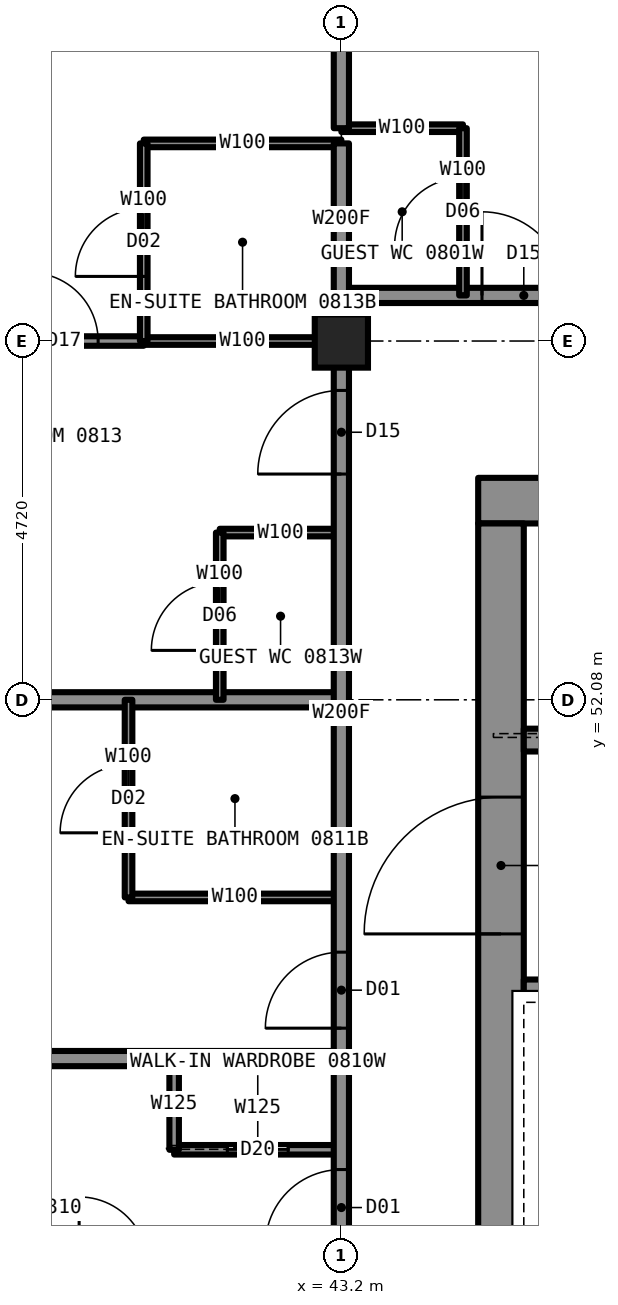
"""IFC4 building model, lengths in metres.
Left out: names, types, materials, properties, quantities, classifications, styles, units other than length and angle.
Written with IfcOpenShell. Run it as: python <this file> out.ifc"""

import sys

from ifc_helpers import new_model, si_unit, direction, frame, frame_2d, origin, origin_2d, place, context, subcontext, project, spatial, rectangle, hollow_rectangle, extrude, element, fill, save


model = new_model("IFC4")
c1 = context("Model", 3, precision=1e-05, world=origin(), true_north=direction((0.0, 1.0)))
c2 = subcontext(c1, "Body", "Model", "MODEL_VIEW")
j1 = project(units=[si_unit("LENGTHUNIT", "METRE"), si_unit("PLANEANGLEUNIT", "RADIAN")], contexts=[c1])
p1 = place(None, origin())
s1 = spatial("IfcSite", under=j1, at=p1, CompositionType="ELEMENT")
p2 = place(p1, origin())
s2 = spatial("IfcBuilding", under=s1, at=p2, CompositionType="ELEMENT")
p3 = place(p2, frame((0.0, 0.0, 28.5)))
s3 = spatial("IfcBuildingStorey", under=s2, at=p3, CompositionType="ELEMENT", Elevation=28.5)
p4 = place(p3, frame((43.2, 56.8, 0.0), z_axis=(0.0, 0.0, 1.0), x_axis=(1.0, 0.0, 0.0)))
e1 = element("IfcColumn", 1, at=p4, inside=s3, PredefinedType="COLUMN", context=c2, shape_type="SweptSolid", body=[
    extrude(hollow_rectangle(XDim=0.7, YDim=0.7, WallThickness=0.06, at=origin_2d()), origin(), (0.0, 0.0, 1.0), 3.5),
])
p5 = place(p3, frame((45.0, 54.7, 0.0), z_axis=(0.0, 0.0, 1.0), x_axis=(1.0, 0.0, 0.0)))
e2 = element("IfcWall", 2, at=p5, inside=s3, PredefinedType="SHEAR", context=c2, shape_type="SweptSolid", body=[
    extrude(rectangle(XDim=20.0, YDim=0.6, at=frame_2d((10.0, 0.0))), origin(), (0.0, 0.0, 1.0), 3.5),
])
p6 = place(p3, frame((45.3, 35.6, 0.0), z_axis=(0.0, 0.0, 1.0), x_axis=(0.0, 1.0, 0.0)))
e3 = element("IfcWall", 3, at=p6, inside=s3, PredefinedType="SHEAR", context=c2, shape_type="SweptSolid", body=[
    extrude(rectangle(XDim=18.8, YDim=0.6, at=frame_2d((9.4, 0.0))), origin(), (0.0, 0.0, 1.0), 3.5),
])
p7 = place(p6, frame((13.4, 0.0, 0.0)))
e4 = element("IfcOpeningElement", 4, at=p7, cuts=e3, PredefinedType="OPENING", context=c2, shape_type="SweptSolid", body=[
    extrude(rectangle(XDim=1.8, YDim=2.2, at=frame_2d((0.9, 1.1))), frame((0.0, 0.31, 0.0), z_axis=(0.0, -1.0, 0.0), x_axis=(1.0, 0.0, 0.0)), (0.0, 0.0, 1.0), 0.62),
])
p8 = place(p6, frame((3.6, 0.0, 0.0)))
e5 = element("IfcOpeningElement", 5, at=p8, cuts=e3, PredefinedType="OPENING", context=c2, shape_type="SweptSolid", body=[
    extrude(rectangle(XDim=1.8, YDim=2.2, at=frame_2d((0.9, 1.1))), frame((0.0, 0.31, 0.0), z_axis=(0.0, -1.0, 0.0), x_axis=(1.0, 0.0, 0.0)), (0.0, 0.0, 1.0), 0.62),
])
p9 = place(p6, frame((6.4, 0.0, 0.0)))
e6 = element("IfcOpeningElement", 6, at=p9, cuts=e3, PredefinedType="OPENING", context=c2, shape_type="SweptSolid", body=[
    extrude(rectangle(XDim=1.2, YDim=2.2, at=frame_2d((0.6, 1.1))), frame((0.0, 0.31, 0.0), z_axis=(0.0, -1.0, 0.0), x_axis=(1.0, 0.0, 0.0)), (0.0, 0.0, 1.0), 0.62),
])
p10 = place(p3, frame((45.6, 51.55, 0.0), z_axis=(0.0, 0.0, 1.0), x_axis=(1.0, 0.0, 0.0)))
e7 = element("IfcWall", 7, at=p10, inside=s3, PredefinedType="SHEAR", context=c2, shape_type="SweptSolid", body=[
    extrude(rectangle(XDim=18.8, YDim=0.3, at=frame_2d((9.4, 0.0))), origin(), (0.0, 0.0, 1.0), 3.5),
])
p11 = place(p10, frame((0.7, 0.0, 0.0)))
e8 = element("IfcOpeningElement", 8, at=p11, cuts=e7, PredefinedType="OPENING", context=c2, shape_type="SweptSolid", body=[
    extrude(rectangle(XDim=1.1, YDim=2.2, at=frame_2d((0.55, 1.1))), frame((0.0, 0.16, 0.0), z_axis=(0.0, -1.0, 0.0), x_axis=(1.0, 0.0, 0.0)), (0.0, 0.0, 1.0), 0.32),
])
p12 = place(p10, frame((3.4, 0.0, 0.0)))
e9 = element("IfcOpeningElement", 9, at=p12, cuts=e7, PredefinedType="OPENING", context=c2, shape_type="SweptSolid", body=[
    extrude(rectangle(XDim=1.1, YDim=2.2, at=frame_2d((0.55, 1.1))), frame((0.0, 0.16, 0.0), z_axis=(0.0, -1.0, 0.0), x_axis=(1.0, 0.0, 0.0)), (0.0, 0.0, 1.0), 0.32),
])
p13 = place(p10, frame((6.1, 0.0, 0.0)))
e10 = element("IfcOpeningElement", 10, at=p13, cuts=e7, PredefinedType="OPENING", context=c2, shape_type="SweptSolid", body=[
    extrude(rectangle(XDim=1.1, YDim=2.2, at=frame_2d((0.55, 1.1))), frame((0.0, 0.16, 0.0), z_axis=(0.0, -1.0, 0.0), x_axis=(1.0, 0.0, 0.0)), (0.0, 0.0, 1.0), 0.32),
])
p14 = place(p10, frame((8.8, 0.0, 0.0)))
e11 = element("IfcOpeningElement", 11, at=p14, cuts=e7, PredefinedType="OPENING", context=c2, shape_type="SweptSolid", body=[
    extrude(rectangle(XDim=1.1, YDim=2.2, at=frame_2d((0.55, 1.1))), frame((0.0, 0.16, 0.0), z_axis=(0.0, -1.0, 0.0), x_axis=(1.0, 0.0, 0.0)), (0.0, 0.0, 1.0), 0.32),
])
p15 = place(p10, frame((11.6, 0.0, 0.0)))
e12 = element("IfcOpeningElement", 12, at=p15, cuts=e7, PredefinedType="OPENING", context=c2, shape_type="SweptSolid", body=[
    extrude(rectangle(XDim=1.1, YDim=2.2, at=frame_2d((0.55, 1.1))), frame((0.0, 0.16, 0.0), z_axis=(0.0, -1.0, 0.0), x_axis=(1.0, 0.0, 0.0)), (0.0, 0.0, 1.0), 0.32),
])
p16 = place(p10, frame((14.3, 0.0, 0.0)))
e13 = element("IfcOpeningElement", 13, at=p16, cuts=e7, PredefinedType="OPENING", context=c2, shape_type="SweptSolid", body=[
    extrude(rectangle(XDim=1.1, YDim=2.2, at=frame_2d((0.55, 1.1))), frame((0.0, 0.16, 0.0), z_axis=(0.0, -1.0, 0.0), x_axis=(1.0, 0.0, 0.0)), (0.0, 0.0, 1.0), 0.32),
])
p17 = place(p3, frame((45.6, 48.25, 0.0), z_axis=(0.0, 0.0, 1.0), x_axis=(1.0, 0.0, 0.0)))
e14 = element("IfcWall", 14, at=p17, inside=s3, PredefinedType="SHEAR", context=c2, shape_type="SweptSolid", body=[
    extrude(rectangle(XDim=7.1, YDim=0.3, at=frame_2d((3.55, 0.0))), origin(), (0.0, 0.0, 1.0), 3.5),
])
p18 = place(p3, frame((41.0, 46.16, 0.0), z_axis=(0.0, 0.0, 1.0), x_axis=(1.0, 0.0, 0.0)))
e15 = element("IfcWall", 15, at=p18, inside=s3, PredefinedType="PARTITIONING", context=c2, shape_type="SweptSolid", body=[
    extrude(rectangle(XDim=2.2, YDim=0.125, at=frame_2d((1.1, 0.0))), origin(), (0.0, 0.0, 1.0), 3.33),
])
p19 = place(p18, frame((0.7, 0.0, 0.0)))
e16 = element("IfcOpeningElement", 16, at=p19, cuts=e15, PredefinedType="OPENING", context=c2, shape_type="SweptSolid", body=[
    extrude(rectangle(XDim=0.8, YDim=2.1, at=frame_2d((0.4, 1.05))), frame((0.0, 0.073, 0.0), z_axis=(0.0, -1.0, 0.0), x_axis=(1.0, 0.0, 0.0)), (0.0, 0.0, 1.0), 0.145),
])
p20 = place(p3, frame((40.6, 56.8, 0.0), z_axis=(0.0, 0.0, 1.0), x_axis=(1.0, 0.0, 0.0)))
e17 = element("IfcWall", 17, at=p20, inside=s3, PredefinedType="PARTITIONING", context=c2, shape_type="SweptSolid", body=[
    extrude(rectangle(XDim=2.6, YDim=0.1, at=frame_2d((1.3, 0.0))), origin(), (0.0, 0.0, 1.0), 2.573),
])
p21 = place(p3, frame((33.3, 56.8, 0.0), z_axis=(0.0, 0.0, 1.0), x_axis=(1.0, 0.0, 0.0)))
e18 = element("IfcWall", 18, at=p21, inside=s3, PredefinedType="PARTITIONING", context=c2, shape_type="SweptSolid", body=[
    extrude(rectangle(XDim=7.3, YDim=0.125, at=frame_2d((3.65, 0.0))), origin(), (0.0, 0.0, 1.0), 2.573),
])
p22 = place(p21, frame((5.8, 0.0, 0.0)))
e19 = element("IfcOpeningElement", 19, at=p22, cuts=e18, PredefinedType="OPENING", context=c2, shape_type="SweptSolid", body=[
    extrude(rectangle(XDim=0.9, YDim=2.2, at=frame_2d((0.45, 1.1))), frame((0.0, 0.073, 0.0), z_axis=(0.0, -1.0, 0.0), x_axis=(1.0, 0.0, 0.0)), (0.0, 0.0, 1.0), 0.145),
])
p23 = place(p21, frame((2.0, 0.0, 0.0)))
e20 = element("IfcOpeningElement", 20, at=p23, cuts=e18, PredefinedType="OPENING", context=c2, shape_type="SweptSolid", body=[
    extrude(rectangle(XDim=0.9, YDim=2.2, at=frame_2d((0.45, 1.1))), frame((0.0, 0.073, 0.0), z_axis=(0.0, -1.0, 0.0), x_axis=(1.0, 0.0, 0.0)), (0.0, 0.0, 1.0), 0.145),
])
p24 = place(p3, frame((43.2, 57.4, 0.0), z_axis=(0.0, 0.0, 1.0), x_axis=(1.0, 0.0, 0.0)))
e21 = element("IfcWall", 21, at=p24, inside=s3, PredefinedType="PARTITIONING", context=c2, shape_type="SweptSolid", body=[
    extrude(rectangle(XDim=23.6, YDim=0.2, at=frame_2d((11.8, 0.0))), origin(), (0.0, 0.0, 1.0), 3.33),
])
p25 = place(p24, frame((1.85, 0.0, 0.0)))
e22 = element("IfcOpeningElement", 22, at=p25, cuts=e21, PredefinedType="OPENING", context=c2, shape_type="SweptSolid", body=[
    extrude(rectangle(XDim=1.1, YDim=2.2, at=frame_2d((0.55, 1.1))), frame((0.0, 0.11, 0.0), z_axis=(0.0, -1.0, 0.0), x_axis=(1.0, 0.0, 0.0)), (0.0, 0.0, 1.0), 0.22),
])
p26 = place(p24, frame((15.62, 0.0, 0.0)))
e23 = element("IfcOpeningElement", 23, at=p26, cuts=e21, PredefinedType="OPENING", context=c2, shape_type="SweptSolid", body=[
    extrude(rectangle(XDim=1.0, YDim=2.2, at=frame_2d((0.5, 1.1))), frame((0.0, 0.11, 0.0), z_axis=(0.0, -1.0, 0.0), x_axis=(1.0, 0.0, 0.0)), (0.0, 0.0, 1.0), 0.22),
])
p27 = place(p24, frame((20.34, 0.0, 0.0)))
e24 = element("IfcOpeningElement", 24, at=p27, cuts=e21, PredefinedType="OPENING", context=c2, shape_type="SweptSolid", body=[
    extrude(rectangle(XDim=1.0, YDim=2.2, at=frame_2d((0.5, 1.1))), frame((0.0, 0.11, 0.0), z_axis=(0.0, -1.0, 0.0), x_axis=(1.0, 0.0, 0.0)), (0.0, 0.0, 1.0), 0.22),
])
p28 = place(p3, frame((40.6, 59.4, 0.0), z_axis=(0.0, 0.0, 1.0), x_axis=(1.0, 0.0, 0.0)))
e25 = element("IfcWall", 25, at=p28, inside=s3, PredefinedType="PARTITIONING", context=c2, shape_type="SweptSolid", body=[
    extrude(rectangle(XDim=2.6, YDim=0.1, at=frame_2d((1.3, 0.0))), origin(), (0.0, 0.0, 1.0), 3.33),
])
p29 = place(p3, frame((43.2, 59.6, 0.0), z_axis=(0.0, 0.0, 1.0), x_axis=(1.0, 0.0, 0.0)))
e26 = element("IfcWall", 26, at=p29, inside=s3, PredefinedType="PARTITIONING", context=c2, shape_type="SweptSolid", body=[
    extrude(rectangle(XDim=1.6, YDim=0.1, at=frame_2d((0.8, 0.0))), origin(), (0.0, 0.0, 1.0), 3.33),
])
p30 = place(p3, frame((33.3, 47.36, 0.0), z_axis=(0.0, 0.0, 1.0), x_axis=(1.0, 0.0, 0.0)))
e27 = element("IfcWall", 27, at=p30, inside=s3, PredefinedType="PARTITIONING", context=c2, shape_type="SweptSolid", body=[
    extrude(rectangle(XDim=9.9, YDim=0.2, at=frame_2d((4.95, 0.0))), origin(), (0.0, 0.0, 1.0), 2.723),
])
p31 = place(p3, frame((40.4, 49.48, 0.0), z_axis=(0.0, 0.0, 1.0), x_axis=(1.0, 0.0, 0.0)))
e28 = element("IfcWall", 28, at=p31, inside=s3, PredefinedType="PARTITIONING", context=c2, shape_type="SweptSolid", body=[
    extrude(rectangle(XDim=2.8, YDim=0.1, at=frame_2d((1.4, 0.0))), origin(), (0.0, 0.0, 1.0), 3.33),
])
p32 = place(p3, frame((33.3, 52.08, 0.0), z_axis=(0.0, 0.0, 1.0), x_axis=(1.0, 0.0, 0.0)))
e29 = element("IfcWall", 29, at=p32, inside=s3, PredefinedType="PARTITIONING", context=c2, shape_type="SweptSolid", body=[
    extrude(rectangle(XDim=9.9, YDim=0.2, at=frame_2d((4.95, 0.0))), origin(), (0.0, 0.0, 1.0), 2.573),
])
p33 = place(p3, frame((41.6, 54.28, 0.0), z_axis=(0.0, 0.0, 1.0), x_axis=(1.0, 0.0, 0.0)))
e30 = element("IfcWall", 30, at=p33, inside=s3, PredefinedType="PARTITIONING", context=c2, shape_type="SweptSolid", body=[
    extrude(rectangle(XDim=1.6, YDim=0.1, at=frame_2d((0.8, 0.0))), origin(), (0.0, 0.0, 1.0), 2.723),
])
p34 = place(p3, frame((44.8, 57.4, 0.0), z_axis=(0.0, 0.0, 1.0), x_axis=(0.0, 1.0, 0.0)))
e31 = element("IfcWall", 31, at=p34, inside=s3, PredefinedType="PARTITIONING", context=c2, shape_type="SweptSolid", body=[
    extrude(rectangle(XDim=2.2, YDim=0.1, at=frame_2d((1.1, 0.0))), origin(), (0.0, 0.0, 1.0), 3.33),
])
p35 = place(p34, frame((0.65, 0.0, 0.0)))
e32 = element("IfcOpeningElement", 32, at=p35, cuts=e31, PredefinedType="OPENING", context=c2, shape_type="SweptSolid", body=[
    extrude(rectangle(XDim=0.9, YDim=2.1, at=frame_2d((0.45, 1.05))), frame((0.0, 0.06, 0.0), z_axis=(0.0, -1.0, 0.0), x_axis=(1.0, 0.0, 0.0)), (0.0, 0.0, 1.0), 0.12),
])
p36 = place(p3, frame((43.2, 33.22, 0.0), z_axis=(0.0, 0.0, 1.0), x_axis=(0.0, 1.0, 0.0)))
e33 = element("IfcWall", 33, at=p36, inside=s3, PredefinedType="PARTITIONING", context=c2, shape_type="SweptSolid", body=[
    extrude(rectangle(XDim=23.56, YDim=0.2, at=frame_2d((11.78, 0.0))), origin(), (0.0, 0.0, 1.0), 3.33),
])
p37 = place(p36, frame((6.16, 0.0, 0.0)))
e34 = element("IfcOpeningElement", 34, at=p37, cuts=e33, PredefinedType="OPENING", context=c2, shape_type="SweptSolid", body=[
    extrude(rectangle(XDim=1.0, YDim=2.2, at=frame_2d((0.5, 1.1))), frame((0.0, 0.11, 0.0), z_axis=(0.0, -1.0, 0.0), x_axis=(1.0, 0.0, 0.0)), (0.0, 0.0, 1.0), 0.22),
])
p38 = place(p36, frame((11.68, 0.0, 0.0)))
e35 = element("IfcOpeningElement", 35, at=p38, cuts=e33, PredefinedType="OPENING", context=c2, shape_type="SweptSolid", body=[
    extrude(rectangle(XDim=1.0, YDim=2.2, at=frame_2d((0.5, 1.1))), frame((0.0, 0.11, 0.0), z_axis=(0.0, -1.0, 0.0), x_axis=(1.0, 0.0, 0.0)), (0.0, 0.0, 1.0), 0.22),
])
p39 = place(p36, frame((14.54, 0.0, 0.0)))
e36 = element("IfcOpeningElement", 36, at=p39, cuts=e33, PredefinedType="OPENING", context=c2, shape_type="SweptSolid", body=[
    extrude(rectangle(XDim=1.0, YDim=2.2, at=frame_2d((0.5, 1.1))), frame((0.0, 0.11, 0.0), z_axis=(0.0, -1.0, 0.0), x_axis=(1.0, 0.0, 0.0)), (0.0, 0.0, 1.0), 0.22),
])
p40 = place(p36, frame((21.83, 0.0, 0.0)))
e37 = element("IfcOpeningElement", 37, at=p40, cuts=e33, PredefinedType="OPENING", context=c2, shape_type="SweptSolid", body=[
    extrude(rectangle(XDim=1.1, YDim=2.2, at=frame_2d((0.55, 1.1))), frame((0.0, 0.11, 0.0), z_axis=(0.0, -1.0, 0.0), x_axis=(1.0, 0.0, 0.0)), (0.0, 0.0, 1.0), 0.22),
])
p41 = place(p36, frame((0.63, 0.0, 0.0)))
e38 = element("IfcOpeningElement", 38, at=p41, cuts=e33, PredefinedType="OPENING", context=c2, shape_type="SweptSolid", body=[
    extrude(rectangle(XDim=1.1, YDim=2.2, at=frame_2d((0.55, 1.1))), frame((0.0, 0.11, 0.0), z_axis=(0.0, -1.0, 0.0), x_axis=(1.0, 0.0, 0.0)), (0.0, 0.0, 1.0), 0.22),
])
p42 = place(p3, frame((43.2, 57.4, 0.0), z_axis=(0.0, 0.0, 1.0), x_axis=(0.0, 1.0, 0.0)))
e39 = element("IfcWall", 39, at=p42, inside=s3, PredefinedType="PARTITIONING", context=c2, shape_type="SweptSolid", body=[
    extrude(rectangle(XDim=2.0, YDim=0.2, at=frame_2d((1.0, 0.0))), origin(), (0.0, 0.0, 1.0), 2.573),
])
p43 = place(p3, frame((43.2, 59.6, 0.0), z_axis=(0.0, 0.0, 1.0), x_axis=(0.0, 1.0, 0.0)))
e40 = element("IfcWall", 40, at=p43, inside=s3, PredefinedType="PARTITIONING", context=c2, shape_type="SweptSolid", body=[
    extrude(rectangle(XDim=7.1, YDim=0.2, at=frame_2d((3.55, 0.0))), origin(), (0.0, 0.0, 1.0), 2.573),
])
p44 = place(p3, frame((41.6, 52.08, 0.0), z_axis=(0.0, 0.0, 1.0), x_axis=(0.0, 1.0, 0.0)))
e41 = element("IfcWall", 41, at=p44, inside=s3, PredefinedType="PARTITIONING", context=c2, shape_type="SweptSolid", body=[
    extrude(rectangle(XDim=2.2, YDim=0.1, at=frame_2d((1.1, 0.0))), origin(), (0.0, 0.0, 1.0), 3.33),
])
p45 = place(p44, frame((0.65, 0.0, 0.0)))
e42 = element("IfcOpeningElement", 42, at=p45, cuts=e41, PredefinedType="OPENING", context=c2, shape_type="SweptSolid", body=[
    extrude(rectangle(XDim=0.9, YDim=2.1, at=frame_2d((0.45, 1.05))), frame((0.0, 0.06, 0.0), z_axis=(0.0, -1.0, 0.0), x_axis=(1.0, 0.0, 0.0)), (0.0, 0.0, 1.0), 0.12),
])
p46 = place(p3, frame((41.0, 46.16, 0.0), z_axis=(0.0, 0.0, 1.0), x_axis=(0.0, 1.0, 0.0)))
e43 = element("IfcWall", 43, at=p46, inside=s3, PredefinedType="PARTITIONING", context=c2, shape_type="SweptSolid", body=[
    extrude(rectangle(XDim=1.2, YDim=0.125, at=frame_2d((0.6, 0.0))), origin(), (0.0, 0.0, 1.0), 3.33),
])
p47 = place(p3, frame((40.6, 56.8, 0.0), z_axis=(0.0, 0.0, 1.0), x_axis=(0.0, 1.0, 0.0)))
e44 = element("IfcWall", 44, at=p47, inside=s3, PredefinedType="PARTITIONING", context=c2, shape_type="SweptSolid", body=[
    extrude(rectangle(XDim=2.6, YDim=0.1, at=frame_2d((1.3, 0.0))), origin(), (0.0, 0.0, 1.0), 3.33),
])
p48 = place(p47, frame((0.85, 0.0, 0.0)))
e45 = element("IfcOpeningElement", 45, at=p48, cuts=e44, PredefinedType="OPENING", context=c2, shape_type="SweptSolid", body=[
    extrude(rectangle(XDim=0.9, YDim=2.1, at=frame_2d((0.45, 1.05))), frame((0.0, 0.06, 0.0), z_axis=(0.0, -1.0, 0.0), x_axis=(1.0, 0.0, 0.0)), (0.0, 0.0, 1.0), 0.12),
])
p49 = place(p3, frame((40.4, 49.48, 0.0), z_axis=(0.0, 0.0, 1.0), x_axis=(0.0, 1.0, 0.0)))
e46 = element("IfcWall", 46, at=p49, inside=s3, PredefinedType="PARTITIONING", context=c2, shape_type="SweptSolid", body=[
    extrude(rectangle(XDim=2.6, YDim=0.1, at=frame_2d((1.3, 0.0))), origin(), (0.0, 0.0, 1.0), 3.33),
])
p50 = place(p49, frame((0.85, 0.0, 0.0)))
e47 = element("IfcOpeningElement", 47, at=p50, cuts=e46, PredefinedType="OPENING", context=c2, shape_type="SweptSolid", body=[
    extrude(rectangle(XDim=0.9, YDim=2.1, at=frame_2d((0.45, 1.05))), frame((0.0, 0.06, 0.0), z_axis=(0.0, -1.0, 0.0), x_axis=(1.0, 0.0, 0.0)), (0.0, 0.0, 1.0), 0.12),
])
p51 = place(p3, frame((43.2, 56.78, 0.0), z_axis=(0.0, 0.0, 1.0), x_axis=(0.0, 1.0, 0.0)))
e48 = element("IfcWall", 48, at=p51, inside=s3, PredefinedType="PARTITIONING", context=c2, shape_type="SweptSolid", body=[
    extrude(rectangle(XDim=0.62, YDim=0.2, at=frame_2d((0.31, 0.0))), origin(), (0.0, 0.0, 1.0), 2.573),
])
p52 = place(p25, origin())
e49 = element("IfcDoor", 49, at=p52, inside=s3, OperationType="SINGLE_SWING_LEFT", PredefinedType="DOOR", context=c2, shape_type="SweptSolid", body=[
    extrude(rectangle(XDim=1.1, YDim=2.2, at=frame_2d((0.55, 1.1))), frame((0.0, 0.025, 0.0), z_axis=(0.0, -1.0, 0.0), x_axis=(1.0, 0.0, 0.0)), (0.0, 0.0, 1.0), 0.05),
])
fill(e22, e49)
p53 = place(p35, origin())
e50 = element("IfcDoor", 50, at=p53, inside=s3, OperationType="SINGLE_SWING_LEFT", PredefinedType="DOOR", context=c2, shape_type="SweptSolid", body=[
    extrude(rectangle(XDim=0.9, YDim=2.1, at=frame_2d((0.45, 1.05))), frame((0.0, 0.025, 0.0), z_axis=(0.0, -1.0, 0.0), x_axis=(1.0, 0.0, 0.0)), (0.0, 0.0, 1.0), 0.05),
])
fill(e32, e50)
p54 = place(p38, origin())
e51 = element("IfcDoor", 51, at=p54, inside=s3, OperationType="SINGLE_SWING_LEFT", PredefinedType="DOOR", context=c2, shape_type="SweptSolid", body=[
    extrude(rectangle(XDim=1.0, YDim=2.2, at=frame_2d((0.5, 1.1))), frame((0.0, 0.025, 0.0), z_axis=(0.0, -1.0, 0.0), x_axis=(1.0, 0.0, 0.0)), (0.0, 0.0, 1.0), 0.05),
])
fill(e35, e51)
p55 = place(p19, origin())
e52 = element("IfcDoor", 52, at=p55, inside=s3, OperationType="SLIDING_TO_LEFT", PredefinedType="DOOR", context=c2, shape_type="SweptSolid", body=[
    extrude(rectangle(XDim=0.8, YDim=2.1, at=frame_2d((0.4, 1.05))), frame((0.0, 0.025, 0.0), z_axis=(0.0, -1.0, 0.0), x_axis=(1.0, 0.0, 0.0)), (0.0, 0.0, 1.0), 0.05),
])
fill(e16, e52)
p56 = place(p39, origin())
e53 = element("IfcDoor", 53, at=p56, inside=s3, OperationType="SINGLE_SWING_LEFT", PredefinedType="DOOR", context=c2, shape_type="SweptSolid", body=[
    extrude(rectangle(XDim=1.0, YDim=2.2, at=frame_2d((0.5, 1.1))), frame((0.0, 0.025, 0.0), z_axis=(0.0, -1.0, 0.0), x_axis=(1.0, 0.0, 0.0)), (0.0, 0.0, 1.0), 0.05),
])
fill(e36, e53)
p57 = place(p50, origin())
e54 = element("IfcDoor", 54, at=p57, inside=s3, OperationType="SINGLE_SWING_RIGHT", PredefinedType="DOOR", context=c2, shape_type="SweptSolid", body=[
    extrude(rectangle(XDim=0.9, YDim=2.1, at=frame_2d((0.45, 1.05))), frame((0.0, 0.025, 0.0), z_axis=(0.0, -1.0, 0.0), x_axis=(1.0, 0.0, 0.0)), (0.0, 0.0, 1.0), 0.05),
])
fill(e47, e54)
p58 = place(p40, origin())
e55 = element("IfcDoor", 55, at=p58, inside=s3, OperationType="SINGLE_SWING_LEFT", PredefinedType="DOOR", context=c2, shape_type="SweptSolid", body=[
    extrude(rectangle(XDim=1.1, YDim=2.2, at=frame_2d((0.55, 1.1))), frame((0.0, 0.025, 0.0), z_axis=(0.0, -1.0, 0.0), x_axis=(1.0, 0.0, 0.0)), (0.0, 0.0, 1.0), 0.05),
])
fill(e37, e55)
p59 = place(p48, origin())
e56 = element("IfcDoor", 56, at=p59, inside=s3, OperationType="SINGLE_SWING_RIGHT", PredefinedType="DOOR", context=c2, shape_type="SweptSolid", body=[
    extrude(rectangle(XDim=0.9, YDim=2.1, at=frame_2d((0.45, 1.05))), frame((0.0, 0.025, 0.0), z_axis=(0.0, -1.0, 0.0), x_axis=(1.0, 0.0, 0.0)), (0.0, 0.0, 1.0), 0.05),
])
fill(e45, e56)
p60 = place(p22, origin())
e57 = element("IfcDoor", 57, at=p60, inside=s3, OperationType="SINGLE_SWING_LEFT", PredefinedType="DOOR", context=c2, shape_type="SweptSolid", body=[
    extrude(rectangle(XDim=0.9, YDim=2.2, at=frame_2d((0.45, 1.1))), frame((0.0, 0.025, 0.0), z_axis=(0.0, -1.0, 0.0), x_axis=(1.0, 0.0, 0.0)), (0.0, 0.0, 1.0), 0.05),
])
fill(e19, e57)
p61 = place(p45, origin())
e58 = element("IfcDoor", 58, at=p61, inside=s3, OperationType="SINGLE_SWING_LEFT", PredefinedType="DOOR", context=c2, shape_type="SweptSolid", body=[
    extrude(rectangle(XDim=0.9, YDim=2.1, at=frame_2d((0.45, 1.05))), frame((0.0, 0.025, 0.0), z_axis=(0.0, -1.0, 0.0), x_axis=(1.0, 0.0, 0.0)), (0.0, 0.0, 1.0), 0.05),
])
fill(e42, e58)
p62 = place(p7, origin())
e59 = element("IfcDoor", 59, at=p62, inside=s3, OperationType="DOUBLE_DOOR_SINGLE_SWING", PredefinedType="DOOR", context=c2, shape_type="SweptSolid", body=[
    extrude(rectangle(XDim=1.8, YDim=2.2, at=frame_2d((0.9, 1.1))), frame((0.0, 0.025, 0.0), z_axis=(0.0, -1.0, 0.0), x_axis=(1.0, 0.0, 0.0)), (0.0, 0.0, 1.0), 0.05),
])
fill(e4, e59)
save(model, sys.argv[1])
